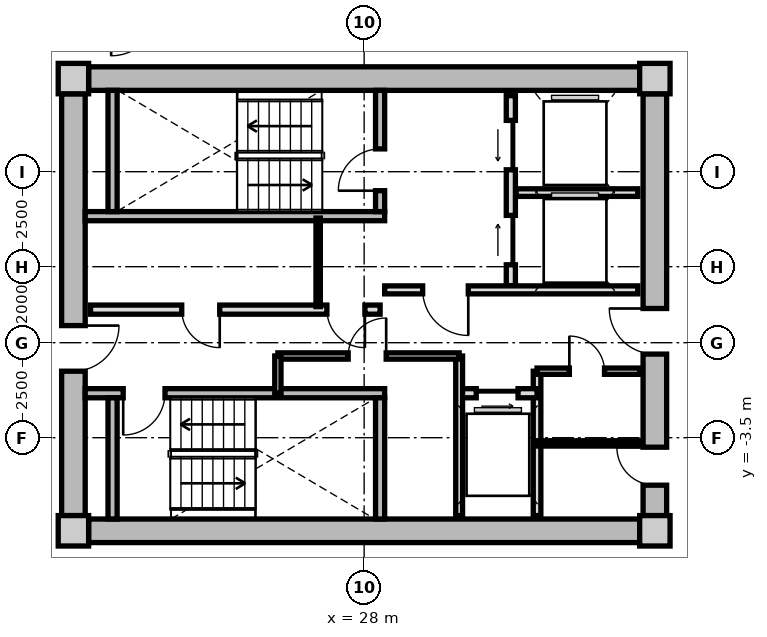
"""IFC4 building model, lengths in metres.
Left out: names, types, materials, properties, quantities, classifications, styles, units other than length and angle.
Written with IfcOpenShell. Run it as: python <this file> out.ifc"""

import sys

from ifc_helpers import new_model, si_unit, direction, frame, frame_2d, origin, origin_2d, place, context, subcontext, project, spatial, rectangle, extrude, source, transform, mapped, element, fill, save


model = new_model("IFC4")
c1 = context("Model", 3, precision=1e-05, world=origin(), true_north=direction((0.0, 1.0)))
c2 = subcontext(c1, "Body", "Model", "MODEL_VIEW")
j1 = project(units=[si_unit("LENGTHUNIT", "METRE"), si_unit("PLANEANGLEUNIT", "RADIAN")], contexts=[c1])
p1 = place(None, origin())
s1 = spatial("IfcSite", under=j1, at=p1, CompositionType="ELEMENT")
p2 = place(p1, origin())
s2 = spatial("IfcBuilding", under=s1, at=p2, CompositionType="ELEMENT")
p3 = place(p2, frame((0.0, 0.0, 170.9)))
s3 = spatial("IfcBuildingStorey", under=s2, at=p3, CompositionType="ELEMENT", Elevation=170.9)
m1 = source(origin(), c2, "Body", "SweptSolid", [
    extrude(rectangle(XDim=0.8, YDim=0.8, at=origin_2d()), origin(), (0.0, 0.0, 1.0), 3.05),
])
for number, where, z_axis, x_axis in (
    (1, (20.35, -5.95, 0.0), (0.0, 0.0, 1.0), (1.0, 0.0, 0.0)),
    (2, (35.65, -5.95, 0.0), (0.0, 0.0, 1.0), (1.0, 0.0, 0.0)),
    (3, (35.65, 5.95, 0.0), (0.0, 0.0, 1.0), (1.0, 0.0, 0.0)),
    (4, (20.35, 5.95, 0.0), (0.0, 0.0, 1.0), (1.0, 0.0, 0.0)),
):
    element("IfcColumn", number, at=place(p3, frame(where, z_axis=z_axis, x_axis=x_axis)), inside=s3, PredefinedType="COLUMN", context=c2, shape_type="MappedRepresentation", body=[
        mapped(m1, transform((0.0, 0.0, 0.0), x_axis=(1.0, 0.0, 0.0), y_axis=(0.0, 1.0, 0.0), z_axis=(0.0, 0.0, 1.0), scale=1.0)),
    ])
m2 = source(origin(), c2, "Body", "SweptSolid", [
    extrude(rectangle(XDim=14.5, YDim=0.62, at=frame_2d((7.25, 0.0))), origin(), (0.0, 0.0, 1.0), 2.81),
])
for number, where, z_axis, x_axis in (
    (5, (20.75, 5.95, 0.0), (0.0, 0.0, 1.0), (1.0, 0.0, 0.0)),
    (6, (35.25, -5.95, 0.0), (0.0, 0.0, 1.0), (-1.0, 0.0, 0.0)),
):
    element("IfcWall", number, at=place(p3, frame(where, z_axis=z_axis, x_axis=x_axis)), inside=s3, PredefinedType="SHEAR", context=c2, shape_type="MappedRepresentation", body=[
        mapped(m2, transform((0.0, 0.0, 0.0), x_axis=(1.0, 0.0, 0.0), y_axis=(0.0, 1.0, 0.0), z_axis=(0.0, 0.0, 1.0), scale=1.0)),
    ])
m3 = source(origin(), c2, "Body", "SweptSolid", [
    extrude(rectangle(XDim=11.1, YDim=0.62, at=frame_2d((5.55, 0.0))), origin(), (0.0, 0.0, 1.0), 2.81),
])
p4 = place(p3, frame((20.35, -5.55, 0.0), z_axis=(0.0, 0.0, 1.0), x_axis=(0.0, 1.0, 0.0)))
e7 = element("IfcWall", 7, at=p4, inside=s3, PredefinedType="SHEAR", context=c2, shape_type="MappedRepresentation", body=[
    mapped(m3, transform((0.0, 0.0, 0.0), x_axis=(1.0, 0.0, 0.0), y_axis=(0.0, 1.0, 0.0), z_axis=(0.0, 0.0, 1.0), scale=1.0)),
])
p5 = place(p4, frame((3.8, 0.0, 0.0)))
e8 = element("IfcOpeningElement", 8, at=p5, cuts=e7, PredefinedType="OPENING", context=c2, shape_type="SweptSolid", body=[
    extrude(rectangle(XDim=1.2, YDim=2.15, at=frame_2d((0.6, 1.075))), frame((0.0, 0.32, 0.0), z_axis=(0.0, -1.0, 0.0), x_axis=(1.0, 0.0, 0.0)), (0.0, 0.0, 1.0), 0.64),
])
p6 = place(p3, frame((35.65, 5.55, 0.0), z_axis=(0.0, 0.0, 1.0), x_axis=(0.0, -1.0, 0.0)))
e9 = element("IfcWall", 9, at=p6, inside=s3, PredefinedType="SHEAR", context=c2, shape_type="MappedRepresentation", body=[
    mapped(m3, transform((0.0, 0.0, 0.0), x_axis=(1.0, 0.0, 0.0), y_axis=(0.0, 1.0, 0.0), z_axis=(0.0, 0.0, 1.0), scale=1.0)),
])
p7 = place(p6, frame((5.65, 0.0, 0.0)))
e10 = element("IfcOpeningElement", 10, at=p7, cuts=e9, PredefinedType="OPENING", context=c2, shape_type="SweptSolid", body=[
    extrude(rectangle(XDim=1.2, YDim=2.15, at=frame_2d((0.6, 1.075))), frame((0.0, 0.32, 0.0), z_axis=(0.0, -1.0, 0.0), x_axis=(1.0, 0.0, 0.0)), (0.0, 0.0, 1.0), 0.64),
])
p8 = place(p6, frame((9.3, 0.0, 0.0)))
e11 = element("IfcOpeningElement", 11, at=p8, cuts=e9, PredefinedType="OPENING", context=c2, shape_type="SweptSolid", body=[
    extrude(rectangle(XDim=1.0, YDim=2.1, at=frame_2d((0.5, 1.05))), frame((0.0, 0.32, 0.0), z_axis=(0.0, -1.0, 0.0), x_axis=(1.0, 0.0, 0.0)), (0.0, 0.0, 1.0), 0.64),
])
m4 = source(origin(), c2, "Body", "SweptSolid", [
    extrude(rectangle(XDim=7.88, YDim=0.24, at=frame_2d((3.94, 0.0))), origin(), (0.0, 0.0, 1.0), 2.81),
])
p9 = place(p3, frame((20.66, 2.33, 0.0), z_axis=(0.0, 0.0, 1.0), x_axis=(1.0, 0.0, 0.0)))
e12 = element("IfcWall", 12, at=p9, inside=s3, PredefinedType="PARTITIONING", context=c2, shape_type="MappedRepresentation", body=[
    mapped(m4, transform((0.0, 0.0, 0.0), x_axis=(1.0, 0.0, 0.0), y_axis=(0.0, 1.0, 0.0), z_axis=(0.0, 0.0, 1.0), scale=1.0)),
])
m5 = source(origin(), c2, "Body", "SweptSolid", [
    extrude(rectangle(XDim=3.19, YDim=0.24, at=frame_2d((1.595, 0.0))), origin(), (0.0, 0.0, 1.0), 2.81),
])
p10 = place(p3, frame((21.38, 2.45, 0.0), z_axis=(0.0, 0.0, 1.0), x_axis=(0.0, 1.0, 0.0)))
e13 = element("IfcWall", 13, at=p10, inside=s3, PredefinedType="PARTITIONING", context=c2, shape_type="MappedRepresentation", body=[
    mapped(m5, transform((0.0, 0.0, 0.0), x_axis=(1.0, 0.0, 0.0), y_axis=(0.0, 1.0, 0.0), z_axis=(0.0, 0.0, 1.0), scale=1.0)),
])
p11 = place(p3, frame((28.42, 2.45, 0.0), z_axis=(0.0, 0.0, 1.0), x_axis=(0.0, 1.0, 0.0)))
e14 = element("IfcWall", 14, at=p11, inside=s3, PredefinedType="PARTITIONING", context=c2, shape_type="MappedRepresentation", body=[
    mapped(m5, transform((0.0, 0.0, 0.0), x_axis=(1.0, 0.0, 0.0), y_axis=(0.0, 1.0, 0.0), z_axis=(0.0, 0.0, 1.0), scale=1.0)),
])
p12 = place(p11, frame((0.55, 0.0, 0.0)))
e15 = element("IfcOpeningElement", 15, at=p12, cuts=e14, PredefinedType="OPENING", context=c2, shape_type="SweptSolid", body=[
    extrude(rectangle(XDim=1.1, YDim=2.15, at=frame_2d((0.55, 1.075))), frame((0.0, 0.13, 0.0), z_axis=(0.0, -1.0, 0.0), x_axis=(1.0, 0.0, 0.0)), (0.0, 0.0, 1.0), 0.26),
])
p13 = place(p3, frame((20.66, -2.33, 0.0), z_axis=(0.0, 0.0, 1.0), x_axis=(1.0, 0.0, 0.0)))
e16 = element("IfcWall", 16, at=p13, inside=s3, PredefinedType="PARTITIONING", context=c2, shape_type="MappedRepresentation", body=[
    mapped(m4, transform((0.0, 0.0, 0.0), x_axis=(1.0, 0.0, 0.0), y_axis=(0.0, 1.0, 0.0), z_axis=(0.0, 0.0, 1.0), scale=1.0)),
])
p14 = place(p13, frame((1.0, 0.0, 0.0)))
e17 = element("IfcOpeningElement", 17, at=p14, cuts=e16, PredefinedType="OPENING", context=c2, shape_type="SweptSolid", body=[
    extrude(rectangle(XDim=1.1, YDim=2.15, at=frame_2d((0.55, 1.075))), frame((0.0, 0.13, 0.0), z_axis=(0.0, -1.0, 0.0), x_axis=(1.0, 0.0, 0.0)), (0.0, 0.0, 1.0), 0.26),
])
for number, where, z_axis, x_axis in (
    (18, (21.38, -5.64, 0.0), (0.0, 0.0, 1.0), (0.0, 1.0, 0.0)),
    (19, (28.42, -5.64, 0.0), (0.0, 0.0, 1.0), (0.0, 1.0, 0.0)),
):
    element("IfcWall", number, at=place(p3, frame(where, z_axis=z_axis, x_axis=x_axis)), inside=s3, PredefinedType="PARTITIONING", context=c2, shape_type="MappedRepresentation", body=[
        mapped(m5, transform((0.0, 0.0, 0.0), x_axis=(1.0, 0.0, 0.0), y_axis=(0.0, 1.0, 0.0), z_axis=(0.0, 0.0, 1.0), scale=1.0)),
    ])
m6 = source(origin(), c2, "Body", "SweptSolid", [
    extrude(rectangle(XDim=5.0, YDim=0.24, at=frame_2d((2.5, 0.0))), origin(), (0.0, 0.0, 1.0), 2.795),
])
p15 = place(p3, frame((31.86, 0.5, 0.0), z_axis=(0.0, 0.0, 1.0), x_axis=(0.0, 1.0, 0.0)))
e20 = element("IfcWall", 20, at=p15, inside=s3, PredefinedType="PARTITIONING", context=c2, shape_type="MappedRepresentation", body=[
    mapped(m6, transform((0.0, 0.0, 0.0), x_axis=(1.0, 0.0, 0.0), y_axis=(0.0, 1.0, 0.0), z_axis=(0.0, 0.0, 1.0), scale=1.0)),
])
p16 = place(p15, frame((3.05, 0.0, 0.0)))
e21 = element("IfcOpeningElement", 21, at=p16, cuts=e20, PredefinedType="OPENING", context=c2, shape_type="SweptSolid", body=[
    extrude(rectangle(XDim=1.3, YDim=2.2, at=frame_2d((0.65, 1.1))), frame((0.0, 0.13, 0.0), z_axis=(0.0, -1.0, 0.0), x_axis=(1.0, 0.0, 0.0)), (0.0, 0.0, 1.0), 0.26),
])
p17 = place(p15, frame((0.55, 0.0, 0.0)))
e22 = element("IfcOpeningElement", 22, at=p17, cuts=e20, PredefinedType="OPENING", context=c2, shape_type="SweptSolid", body=[
    extrude(rectangle(XDim=1.3, YDim=2.2, at=frame_2d((0.65, 1.1))), frame((0.0, 0.13, 0.0), z_axis=(0.0, -1.0, 0.0), x_axis=(1.0, 0.0, 0.0)), (0.0, 0.0, 1.0), 0.26),
])
m7 = source(origin(), c2, "Body", "SweptSolid", [
    extrude(rectangle(XDim=3.2, YDim=0.2, at=frame_2d((1.6, 0.0))), origin(), (0.0, 0.0, 1.0), 2.795),
])
p18 = place(p3, frame((32.0, 2.95, 0.0), z_axis=(0.0, 0.0, 1.0), x_axis=(1.0, 0.0, 0.0)))
e23 = element("IfcWall", 23, at=p18, inside=s3, PredefinedType="PARTITIONING", context=c2, shape_type="MappedRepresentation", body=[
    mapped(m7, transform((0.0, 0.0, 0.0), x_axis=(1.0, 0.0, 0.0), y_axis=(0.0, 1.0, 0.0), z_axis=(0.0, 0.0, 1.0), scale=1.0)),
])
m8 = source(origin(), c2, "Body", "SweptSolid", [
    extrude(rectangle(XDim=6.66, YDim=0.21, at=frame_2d((3.33, 0.0))), origin(), (0.0, 0.0, 1.0), 2.795),
])
p19 = place(p3, frame((28.54, 0.39, 0.0), z_axis=(0.0, 0.0, 1.0), x_axis=(1.0, 0.0, 0.0)))
e24 = element("IfcWall", 24, at=p19, inside=s3, PredefinedType="PARTITIONING", context=c2, shape_type="MappedRepresentation", body=[
    mapped(m8, transform((0.0, 0.0, 0.0), x_axis=(1.0, 0.0, 0.0), y_axis=(0.0, 1.0, 0.0), z_axis=(0.0, 0.0, 1.0), scale=1.0)),
])
p20 = place(p19, frame((1.0, 0.0, 0.0)))
e25 = element("IfcOpeningElement", 25, at=p20, cuts=e24, PredefinedType="OPENING", context=c2, shape_type="SweptSolid", body=[
    extrude(rectangle(XDim=1.2, YDim=2.15, at=frame_2d((0.6, 1.075))), frame((0.0, 0.115, 0.0), z_axis=(0.0, -1.0, 0.0), x_axis=(1.0, 0.0, 0.0)), (0.0, 0.0, 1.0), 0.23),
])
m9 = source(origin(), c2, "Body", "SweptSolid", [
    extrude(rectangle(XDim=7.62, YDim=0.24, at=frame_2d((3.81, 0.0))), origin(), (0.0, 0.0, 1.0), 2.795),
])
p21 = place(p3, frame((20.8, -0.13, 0.0), z_axis=(0.0, 0.0, 1.0), x_axis=(1.0, 0.0, 0.0)))
e26 = element("IfcWall", 26, at=p21, inside=s3, PredefinedType="PARTITIONING", context=c2, shape_type="MappedRepresentation", body=[
    mapped(m9, transform((0.0, 0.0, 0.0), x_axis=(1.0, 0.0, 0.0), y_axis=(0.0, 1.0, 0.0), z_axis=(0.0, 0.0, 1.0), scale=1.0)),
])
p22 = place(p21, frame((6.22, 0.0, 0.0)))
e27 = element("IfcOpeningElement", 27, at=p22, cuts=e26, PredefinedType="OPENING", context=c2, shape_type="SweptSolid", body=[
    extrude(rectangle(XDim=1.0, YDim=2.1, at=frame_2d((0.5, 1.05))), frame((0.0, 0.13, 0.0), z_axis=(0.0, -1.0, 0.0), x_axis=(1.0, 0.0, 0.0)), (0.0, 0.0, 1.0), 0.26),
])
p23 = place(p21, frame((2.4, 0.0, 0.0)))
e28 = element("IfcOpeningElement", 28, at=p23, cuts=e26, PredefinedType="OPENING", context=c2, shape_type="SweptSolid", body=[
    extrude(rectangle(XDim=1.0, YDim=2.1, at=frame_2d((0.5, 1.05))), frame((0.0, 0.13, 0.0), z_axis=(0.0, -1.0, 0.0), x_axis=(1.0, 0.0, 0.0)), (0.0, 0.0, 1.0), 0.26),
])
m10 = source(origin(), c2, "Body", "SweptSolid", [
    extrude(rectangle(XDim=2.33, YDim=0.115, at=frame_2d((1.165, 0.0))), origin(), (0.0, 0.0, 1.0), 2.795),
])
p24 = place(p3, frame((26.79, -0.05, 0.0), z_axis=(0.0, 0.0, 1.0), x_axis=(0.0, 1.0, 0.0)))
e29 = element("IfcWall", 29, at=p24, inside=s3, PredefinedType="PARTITIONING", context=c2, shape_type="MappedRepresentation", body=[
    mapped(m10, transform((0.0, 0.0, 0.0), x_axis=(1.0, 0.0, 0.0), y_axis=(0.0, 1.0, 0.0), z_axis=(0.0, 0.0, 1.0), scale=1.0)),
])
m11 = source(origin(), c2, "Body", "SweptSolid", [
    extrude(rectangle(XDim=3.8, YDim=0.2, at=frame_2d((1.9, 0.0))), origin(), (0.0, 0.0, 1.0), 2.795),
])
p25 = place(p3, frame((32.55, -5.55, 0.0), z_axis=(0.0, 0.0, 1.0), x_axis=(0.0, 1.0, 0.0)))
e30 = element("IfcWall", 30, at=p25, inside=s3, PredefinedType="PARTITIONING", context=c2, shape_type="MappedRepresentation", body=[
    mapped(m11, transform((0.0, 0.0, 0.0), x_axis=(1.0, 0.0, 0.0), y_axis=(0.0, 1.0, 0.0), z_axis=(0.0, 0.0, 1.0), scale=1.0)),
])
m12 = source(origin(), c2, "Body", "SweptSolid", [
    extrude(rectangle(XDim=2.05, YDim=0.24, at=frame_2d((1.025, 0.0))), origin(), (0.0, 0.0, 1.0), 2.795),
])
p26 = place(p3, frame((30.5, -2.33, 0.0), z_axis=(0.0, 0.0, 1.0), x_axis=(1.0, 0.0, 0.0)))
e31 = element("IfcWall", 31, at=p26, inside=s3, PredefinedType="PARTITIONING", context=c2, shape_type="MappedRepresentation", body=[
    mapped(m12, transform((0.0, 0.0, 0.0), x_axis=(1.0, 0.0, 0.0), y_axis=(0.0, 1.0, 0.0), z_axis=(0.0, 0.0, 1.0), scale=1.0)),
])
p27 = place(p26, frame((0.45, 0.0, 0.0)))
e32 = element("IfcOpeningElement", 32, at=p27, cuts=e31, PredefinedType="OPENING", context=c2, shape_type="SweptSolid", body=[
    extrude(rectangle(XDim=1.1, YDim=2.2, at=frame_2d((0.55, 1.1))), frame((0.0, 0.13, 0.0), z_axis=(0.0, -1.0, 0.0), x_axis=(1.0, 0.0, 0.0)), (0.0, 0.0, 1.0), 0.26),
])
m13 = source(origin(), c2, "Body", "SweptSolid", [
    extrude(rectangle(XDim=4.2, YDim=0.18, at=frame_2d((2.1, 0.0))), origin(), (0.0, 0.0, 1.0), 2.795),
])
p28 = place(p3, frame((30.5, -5.55, 0.0), z_axis=(0.0, 0.0, 1.0), x_axis=(0.0, 1.0, 0.0)))
e33 = element("IfcWall", 33, at=p28, inside=s3, PredefinedType="PARTITIONING", context=c2, shape_type="MappedRepresentation", body=[
    mapped(m13, transform((0.0, 0.0, 0.0), x_axis=(1.0, 0.0, 0.0), y_axis=(0.0, 1.0, 0.0), z_axis=(0.0, 0.0, 1.0), scale=1.0)),
])
m14 = source(origin(), c2, "Body", "SweptSolid", [
    extrude(rectangle(XDim=4.77, YDim=0.165, at=frame_2d((2.385, 0.0))), origin(), (0.0, 0.0, 1.0), 2.795),
])
p29 = place(p3, frame((25.73, -1.35, 0.0), z_axis=(0.0, 0.0, 1.0), x_axis=(1.0, 0.0, 0.0)))
e34 = element("IfcWall", 34, at=p29, inside=s3, PredefinedType="PARTITIONING", context=c2, shape_type="MappedRepresentation", body=[
    mapped(m14, transform((0.0, 0.0, 0.0), x_axis=(1.0, 0.0, 0.0), y_axis=(0.0, 1.0, 0.0), z_axis=(0.0, 0.0, 1.0), scale=1.0)),
])
p30 = place(p29, frame((1.85, 0.0, 0.0)))
e35 = element("IfcOpeningElement", 35, at=p30, cuts=e34, PredefinedType="OPENING", context=c2, shape_type="SweptSolid", body=[
    extrude(rectangle(XDim=1.0, YDim=2.1, at=frame_2d((0.5, 1.05))), frame((0.0, 0.093, 0.0), z_axis=(0.0, -1.0, 0.0), x_axis=(1.0, 0.0, 0.0)), (0.0, 0.0, 1.0), 0.185),
])
m15 = source(origin(), c2, "Body", "SweptSolid", [
    extrude(rectangle(XDim=0.98, YDim=0.165, at=frame_2d((0.49, 0.0))), origin(), (0.0, 0.0, 1.0), 2.795),
])
p31 = place(p3, frame((25.73, -2.33, 0.0), z_axis=(0.0, 0.0, 1.0), x_axis=(0.0, 1.0, 0.0)))
e36 = element("IfcWall", 36, at=p31, inside=s3, PredefinedType="PARTITIONING", context=c2, shape_type="MappedRepresentation", body=[
    mapped(m15, transform((0.0, 0.0, 0.0), x_axis=(1.0, 0.0, 0.0), y_axis=(0.0, 1.0, 0.0), z_axis=(0.0, 0.0, 1.0), scale=1.0)),
])
m16 = source(origin(), c2, "Body", "SweptSolid", [
    extrude(rectangle(XDim=2.7, YDim=0.165, at=frame_2d((1.35, 0.0))), origin(), (0.0, 0.0, 1.0), 2.795),
])
p32 = place(p3, frame((32.55, -1.75, 0.0), z_axis=(0.0, 0.0, 1.0), x_axis=(1.0, 0.0, 0.0)))
e37 = element("IfcWall", 37, at=p32, inside=s3, PredefinedType="PARTITIONING", context=c2, shape_type="MappedRepresentation", body=[
    mapped(m16, transform((0.0, 0.0, 0.0), x_axis=(1.0, 0.0, 0.0), y_axis=(0.0, 1.0, 0.0), z_axis=(0.0, 0.0, 1.0), scale=1.0)),
])
p33 = place(p32, frame((0.85, 0.0, 0.0)))
e38 = element("IfcOpeningElement", 38, at=p33, cuts=e37, PredefinedType="OPENING", context=c2, shape_type="SweptSolid", body=[
    extrude(rectangle(XDim=0.925, YDim=2.1, at=frame_2d((0.462, 1.05))), frame((0.0, 0.093, 0.0), z_axis=(0.0, -1.0, 0.0), x_axis=(1.0, 0.0, 0.0)), (0.0, 0.0, 1.0), 0.185),
])
m17 = source(origin(), c2, "Body", "SweptSolid", [
    extrude(rectangle(XDim=2.7, YDim=0.14, at=frame_2d((1.35, 0.0))), origin(), (0.0, 0.0, 1.0), 2.795),
])
p34 = place(p3, frame((32.55, -3.65, 0.0), z_axis=(0.0, 0.0, 1.0), x_axis=(1.0, 0.0, 0.0)))
e39 = element("IfcWall", 39, at=p34, inside=s3, PredefinedType="PARTITIONING", context=c2, shape_type="MappedRepresentation", body=[
    mapped(m17, transform((0.0, 0.0, 0.0), x_axis=(1.0, 0.0, 0.0), y_axis=(0.0, 1.0, 0.0), z_axis=(0.0, 0.0, 1.0), scale=1.0)),
])
m18 = source(origin(), c2, "Body", "SweptSolid", [
    extrude(rectangle(XDim=1.1, YDim=2.15, at=frame_2d((0.55, 1.075))), frame((0.0, 0.025, 0.0), z_axis=(0.0, -1.0, 0.0), x_axis=(1.0, 0.0, 0.0)), (0.0, 0.0, 1.0), 0.05),
])
p35 = place(p12, origin())
e40 = element("IfcDoor", 40, at=p35, inside=s3, OperationType="SINGLE_SWING_LEFT", PredefinedType="DOOR", context=c2, shape_type="MappedRepresentation", body=[
    mapped(m18, transform((0.0, 0.0, 0.0), x_axis=(1.0, 0.0, 0.0), y_axis=(0.0, 1.0, 0.0), z_axis=(0.0, 0.0, 1.0), scale=1.0)),
])
fill(e15, e40)
p36 = place(p14, frame((1.1, 0.0, 0.0), z_axis=(0.0, 0.0, 1.0), x_axis=(-1.0, 0.0, 0.0)))
e41 = element("IfcDoor", 41, at=p36, inside=s3, OperationType="SINGLE_SWING_RIGHT", PredefinedType="DOOR", context=c2, shape_type="MappedRepresentation", body=[
    mapped(m18, transform((0.0, 0.0, 0.0), x_axis=(1.0, 0.0, 0.0), y_axis=(0.0, 1.0, 0.0), z_axis=(0.0, 0.0, 1.0), scale=1.0)),
])
fill(e17, e41)
m19 = source(origin(), c2, "Body", "SweptSolid", [
    extrude(rectangle(XDim=1.3, YDim=2.2, at=frame_2d((0.65, 1.1))), frame((0.0, 0.025, 0.0), z_axis=(0.0, -1.0, 0.0), x_axis=(1.0, 0.0, 0.0)), (0.0, 0.0, 1.0), 0.05),
])
p37 = place(p16, origin())
e42 = element("IfcDoor", 42, at=p37, inside=s3, OperationType="SLIDING_TO_LEFT", PredefinedType="DOOR", context=c2, shape_type="MappedRepresentation", body=[
    mapped(m19, transform((0.0, 0.0, 0.0), x_axis=(1.0, 0.0, 0.0), y_axis=(0.0, 1.0, 0.0), z_axis=(0.0, 0.0, 1.0), scale=1.0)),
])
fill(e21, e42)
p38 = place(p17, origin())
e43 = element("IfcDoor", 43, at=p38, inside=s3, OperationType="SLIDING_TO_RIGHT", PredefinedType="DOOR", context=c2, shape_type="MappedRepresentation", body=[
    mapped(m19, transform((0.0, 0.0, 0.0), x_axis=(1.0, 0.0, 0.0), y_axis=(0.0, 1.0, 0.0), z_axis=(0.0, 0.0, 1.0), scale=1.0)),
])
fill(e22, e43)
m20 = source(origin(), c2, "Body", "SweptSolid", [
    extrude(rectangle(XDim=1.2, YDim=2.15, at=frame_2d((0.6, 1.075))), frame((0.0, 0.025, 0.0), z_axis=(0.0, -1.0, 0.0), x_axis=(1.0, 0.0, 0.0)), (0.0, 0.0, 1.0), 0.05),
])
p39 = place(p20, frame((1.2, 0.0, 0.0), z_axis=(0.0, 0.0, 1.0), x_axis=(-1.0, 0.0, 0.0)))
e44 = element("IfcDoor", 44, at=p39, inside=s3, OperationType="SINGLE_SWING_LEFT", PredefinedType="DOOR", context=c2, shape_type="MappedRepresentation", body=[
    mapped(m20, transform((0.0, 0.0, 0.0), x_axis=(1.0, 0.0, 0.0), y_axis=(0.0, 1.0, 0.0), z_axis=(0.0, 0.0, 1.0), scale=1.0)),
])
fill(e25, e44)
p40 = place(p5, frame((1.2, 0.0, 0.0), z_axis=(0.0, 0.0, 1.0), x_axis=(-1.0, 0.0, 0.0)))
e45 = element("IfcDoor", 45, at=p40, inside=s3, OperationType="SINGLE_SWING_LEFT", PredefinedType="DOOR", context=c2, shape_type="MappedRepresentation", body=[
    mapped(m20, transform((0.0, 0.0, 0.0), x_axis=(1.0, 0.0, 0.0), y_axis=(0.0, 1.0, 0.0), z_axis=(0.0, 0.0, 1.0), scale=1.0)),
])
fill(e8, e45)
p41 = place(p7, frame((1.2, 0.0, 0.0), z_axis=(0.0, 0.0, 1.0), x_axis=(-1.0, 0.0, 0.0)))
e46 = element("IfcDoor", 46, at=p41, inside=s3, OperationType="SINGLE_SWING_RIGHT", PredefinedType="DOOR", context=c2, shape_type="MappedRepresentation", body=[
    mapped(m20, transform((0.0, 0.0, 0.0), x_axis=(1.0, 0.0, 0.0), y_axis=(0.0, 1.0, 0.0), z_axis=(0.0, 0.0, 1.0), scale=1.0)),
])
fill(e10, e46)
m21 = source(origin(), c2, "Body", "SweptSolid", [
    extrude(rectangle(XDim=1.0, YDim=2.1, at=frame_2d((0.5, 1.05))), frame((0.0, 0.025, 0.0), z_axis=(0.0, -1.0, 0.0), x_axis=(1.0, 0.0, 0.0)), (0.0, 0.0, 1.0), 0.05),
])
p42 = place(p22, frame((1.0, 0.0, 0.0), z_axis=(0.0, 0.0, 1.0), x_axis=(-1.0, 0.0, 0.0)))
e47 = element("IfcDoor", 47, at=p42, inside=s3, OperationType="SINGLE_SWING_LEFT", PredefinedType="DOOR", context=c2, shape_type="MappedRepresentation", body=[
    mapped(m21, transform((0.0, 0.0, 0.0), x_axis=(1.0, 0.0, 0.0), y_axis=(0.0, 1.0, 0.0), z_axis=(0.0, 0.0, 1.0), scale=1.0)),
])
fill(e27, e47)
p43 = place(p23, frame((1.0, 0.0, 0.0), z_axis=(0.0, 0.0, 1.0), x_axis=(-1.0, 0.0, 0.0)))
e48 = element("IfcDoor", 48, at=p43, inside=s3, OperationType="SINGLE_SWING_LEFT", PredefinedType="DOOR", context=c2, shape_type="MappedRepresentation", body=[
    mapped(m21, transform((0.0, 0.0, 0.0), x_axis=(1.0, 0.0, 0.0), y_axis=(0.0, 1.0, 0.0), z_axis=(0.0, 0.0, 1.0), scale=1.0)),
])
fill(e28, e48)
m22 = source(origin(), c2, "Body", "SweptSolid", [
    extrude(rectangle(XDim=1.1, YDim=2.2, at=frame_2d((0.55, 1.1))), frame((0.0, 0.025, 0.0), z_axis=(0.0, -1.0, 0.0), x_axis=(1.0, 0.0, 0.0)), (0.0, 0.0, 1.0), 0.05),
])
p44 = place(p27, frame((1.1, 0.0, 0.0), z_axis=(0.0, 0.0, 1.0), x_axis=(-1.0, 0.0, 0.0)))
e49 = element("IfcDoor", 49, at=p44, inside=s3, OperationType="SLIDING_TO_RIGHT", PredefinedType="DOOR", context=c2, shape_type="MappedRepresentation", body=[
    mapped(m22, transform((0.0, 0.0, 0.0), x_axis=(1.0, 0.0, 0.0), y_axis=(0.0, 1.0, 0.0), z_axis=(0.0, 0.0, 1.0), scale=1.0)),
])
fill(e32, e49)
p45 = place(p30, origin())
e50 = element("IfcDoor", 50, at=p45, inside=s3, OperationType="SINGLE_SWING_RIGHT", PredefinedType="DOOR", context=c2, shape_type="MappedRepresentation", body=[
    mapped(m21, transform((0.0, 0.0, 0.0), x_axis=(1.0, 0.0, 0.0), y_axis=(0.0, 1.0, 0.0), z_axis=(0.0, 0.0, 1.0), scale=1.0)),
])
fill(e35, e50)
m23 = source(origin(), c2, "Body", "SweptSolid", [
    extrude(rectangle(XDim=0.925, YDim=2.1, at=frame_2d((0.462, 1.05))), frame((0.0, 0.025, 0.0), z_axis=(0.0, -1.0, 0.0), x_axis=(1.0, 0.0, 0.0)), (0.0, 0.0, 1.0), 0.05),
])
p46 = place(p33, origin())
e51 = element("IfcDoor", 51, at=p46, inside=s3, OperationType="SINGLE_SWING_LEFT", PredefinedType="DOOR", context=c2, shape_type="MappedRepresentation", body=[
    mapped(m23, transform((0.0, 0.0, 0.0), x_axis=(1.0, 0.0, 0.0), y_axis=(0.0, 1.0, 0.0), z_axis=(0.0, 0.0, 1.0), scale=1.0)),
])
fill(e38, e51)
p47 = place(p8, frame((1.0, 0.0, 0.0), z_axis=(0.0, 0.0, 1.0), x_axis=(-1.0, 0.0, 0.0)))
e52 = element("IfcDoor", 52, at=p47, inside=s3, OperationType="SINGLE_SWING_RIGHT", PredefinedType="DOOR", context=c2, shape_type="MappedRepresentation", body=[
    mapped(m21, transform((0.0, 0.0, 0.0), x_axis=(1.0, 0.0, 0.0), y_axis=(0.0, 1.0, 0.0), z_axis=(0.0, 0.0, 1.0), scale=1.0)),
])
fill(e11, e52)
save(model, sys.argv[1])
